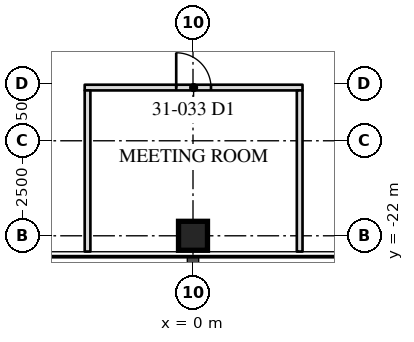
"""IFC4 building model, lengths in metres.
Left out: names, types, materials, properties, quantities, classifications, styles, units other than length and angle.
Written with IfcOpenShell. Run it as: python <this file> out.ifc"""

import sys

from ifc_helpers import new_model, si_unit, direction, frame, frame_2d, origin, origin_2d, place, context, subcontext, project, spatial, rectangle, hollow_rectangle, extrude, element, fill, save


model = new_model("IFC4")
c1 = context("Model", 3, precision=1e-05, world=origin(), true_north=direction((0.0, 1.0)))
c2 = subcontext(c1, "Body", "Model", "MODEL_VIEW")
j1 = project(units=[si_unit("LENGTHUNIT", "METRE"), si_unit("PLANEANGLEUNIT", "RADIAN")], contexts=[c1])
p1 = place(None, origin())
s1 = spatial("IfcSite", under=j1, at=p1, CompositionType="ELEMENT")
p2 = place(p1, origin())
s2 = spatial("IfcBuilding", under=s1, at=p2, CompositionType="ELEMENT")
p3 = place(p2, frame((0.0, 0.0, 133.6)))
s3 = spatial("IfcBuildingStorey", under=s2, at=p3, CompositionType="ELEMENT", Elevation=133.6)
p4 = place(p3, frame((0.0, -22.0, 0.0), z_axis=(0.0, 0.0, 1.0), x_axis=(1.0, 0.0, 0.0)))
e1 = element("IfcColumn", 1, at=p4, inside=s3, PredefinedType="COLUMN", context=c2, shape_type="SweptSolid", body=[
    extrude(hollow_rectangle(XDim=0.762, YDim=0.762, WallThickness=0.076, at=origin_2d()), origin(), (0.0, 0.0, 1.0), 4.1),
])
p5 = place(p3, frame((-2.85, -18.1, 0.0), z_axis=(0.0, 0.0, 1.0), x_axis=(1.0, 0.0, 0.0)))
e2 = element("IfcWall", 2, at=p5, inside=s3, PredefinedType="PARTITIONING", context=c2, shape_type="SweptSolid", body=[
    extrude(rectangle(XDim=5.732, YDim=0.15, at=frame_2d((2.866, 0.0))), origin(), (0.0, 0.0, 1.0), 3.91),
])
p6 = place(p5, frame((2.408, 0.0, 0.0)))
e3 = element("IfcOpeningElement", 3, at=p6, cuts=e2, PredefinedType="OPENING", context=c2, shape_type="SweptSolid", body=[
    extrude(rectangle(XDim=0.915, YDim=2.134, at=frame_2d((0.458, 1.067))), frame((0.0, 0.085, 0.0), z_axis=(0.0, -1.0, 0.0), x_axis=(1.0, 0.0, 0.0)), (0.0, 0.0, 1.0), 0.17),
])
for number, where, z_axis, x_axis in (
    (4, (-2.775, -18.175, 0.0), (0.0, 0.0, 1.0), (0.0, -1.0, 0.0)),
    (5, (2.807, -18.175, 0.0), (0.0, 0.0, 1.0), (0.0, -1.0, 0.0)),
):
    element("IfcWall", number, at=place(p3, frame(where, z_axis=z_axis, x_axis=x_axis)), inside=s3, PredefinedType="PARTITIONING", context=c2, shape_type="SweptSolid", body=[
        extrude(rectangle(XDim=4.24, YDim=0.15, at=frame_2d((2.12, 0.0))), origin(), (0.0, 0.0, 1.0), 3.91),
    ])
p7 = place(p6, origin())
e6 = element("IfcDoor", 6, at=p7, inside=s3, OperationType="SINGLE_SWING_LEFT", PredefinedType="DOOR", context=c2, shape_type="SweptSolid", body=[
    extrude(rectangle(XDim=0.915, YDim=2.134, at=frame_2d((0.458, 1.067))), frame((0.0, 0.025, 0.0), z_axis=(0.0, -1.0, 0.0), x_axis=(1.0, 0.0, 0.0)), (0.0, 0.0, 1.0), 0.05),
])
fill(e3, e6)
save(model, sys.argv[1])
